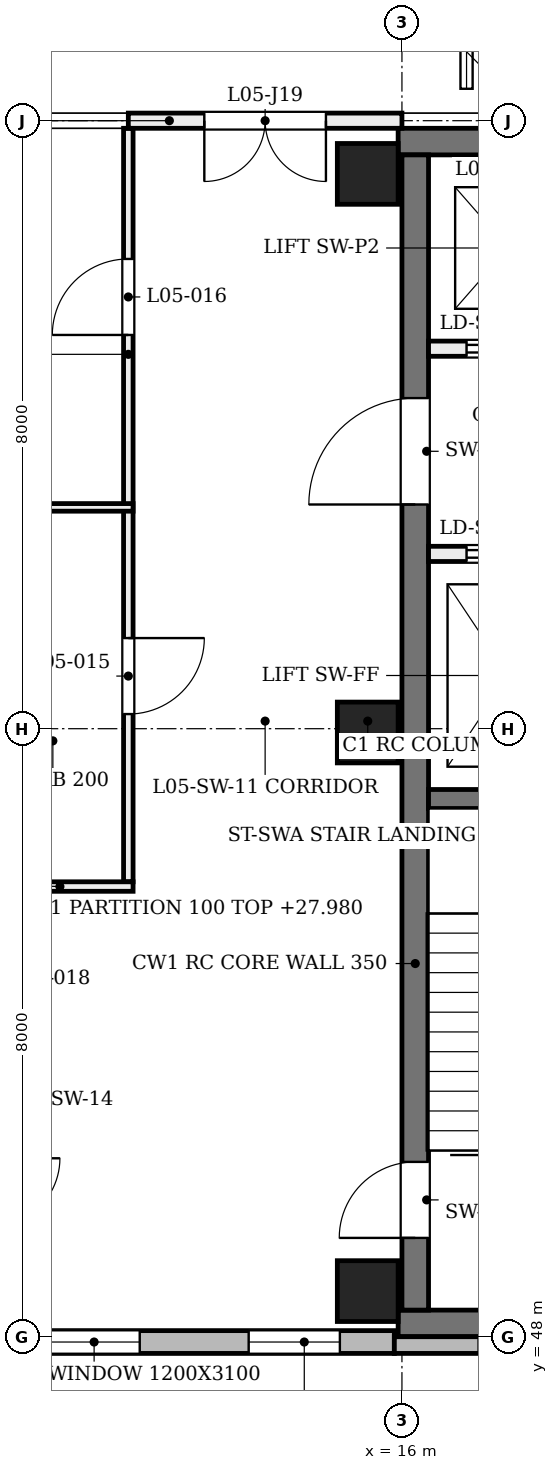
"""IFC4 building model, lengths in metres.
Left out: names, types, materials, properties, quantities, classifications, styles, units other than length and angle.
Written with IfcOpenShell. Run it as: python <this file> out.ifc"""

import sys

from ifc_helpers import new_model, si_unit, direction, frame, frame_2d, origin, origin_2d, place, context, subcontext, project, spatial, rectangle, extrude, element, fill, save


model = new_model("IFC4")
c1 = context("Model", 3, precision=1e-05, world=origin(), true_north=direction((0.0, 1.0)))
c2 = subcontext(c1, "Body", "Model", "MODEL_VIEW")
j1 = project(units=[si_unit("LENGTHUNIT", "METRE"), si_unit("PLANEANGLEUNIT", "RADIAN")], contexts=[c1])
p1 = place(None, origin())
s1 = spatial("IfcSite", under=j1, at=p1, CompositionType="ELEMENT")
p2 = place(p1, origin())
s2 = spatial("IfcBuilding", under=s1, at=p2, CompositionType="ELEMENT")
p3 = place(p2, frame((0.0, 0.0, 24.0)))
s3 = spatial("IfcBuildingStorey", under=s2, at=p3, CompositionType="ELEMENT", Elevation=24.0)
for number, where, z_axis, x_axis in (
    (1, (15.95, 48.175, 0.0), (0.0, 0.0, 1.0), (1.0, 0.0, 0.0)),
    (2, (15.95, 63.725, 0.0), (0.0, 0.0, 1.0), (1.0, 0.0, 0.0)),
):
    element("IfcWall", number, at=place(p3, frame(where, z_axis=z_axis, x_axis=x_axis)), inside=s3, PredefinedType="SHEAR", context=c2, shape_type="SweptSolid", body=[
        extrude(rectangle(XDim=7.95, YDim=0.35, at=frame_2d((3.975, 0.0))), origin(), (0.0, 0.0, 1.0), 4.58),
    ])
p4 = place(p3, frame((16.175, 48.35, 0.0), z_axis=(0.0, 0.0, 1.0), x_axis=(0.0, 1.0, 0.0)))
e3 = element("IfcWall", 3, at=p4, inside=s3, PredefinedType="SHEAR", context=c2, shape_type="SweptSolid", body=[
    extrude(rectangle(XDim=15.2, YDim=0.35, at=frame_2d((7.6, 0.0))), origin(), (0.0, 0.0, 1.0), 4.58),
])
p5 = place(p4, frame((0.95, 0.0, 0.0)))
e4 = element("IfcOpeningElement", 4, at=p5, cuts=e3, PredefinedType="OPENING", context=c2, shape_type="SweptSolid", body=[
    extrude(rectangle(XDim=1.0, YDim=2.1, at=frame_2d((0.5, 1.05))), frame((0.0, 0.185, 0.0), z_axis=(0.0, -1.0, 0.0), x_axis=(1.0, 0.0, 0.0)), (0.0, 0.0, 1.0), 0.37),
])
p6 = place(p4, frame((10.6, 0.0, 0.0)))
e5 = element("IfcOpeningElement", 5, at=p6, cuts=e3, PredefinedType="OPENING", context=c2, shape_type="SweptSolid", body=[
    extrude(rectangle(XDim=1.4, YDim=2.1, at=frame_2d((0.7, 1.05))), frame((0.0, 0.185, 0.0), z_axis=(0.0, -1.0, 0.0), x_axis=(1.0, 0.0, 0.0)), (0.0, 0.0, 1.0), 0.37),
])
for number, where, z_axis, x_axis in (
    (6, (15.55, 48.6, 0.0), (0.0, 0.0, 1.0), (1.0, 0.0, 0.0)),
    (7, (15.55, 55.95, 0.0), (0.0, 0.0, 1.0), (1.0, 0.0, 0.0)),
    (8, (15.55, 63.3, 0.0), (0.0, 0.0, 1.0), (1.0, 0.0, 0.0)),
):
    element("IfcColumn", number, at=place(p3, frame(where, z_axis=z_axis, x_axis=x_axis)), inside=s3, PredefinedType="COLUMN", context=c2, shape_type="SweptSolid", body=[
        extrude(rectangle(XDim=0.8, YDim=0.8, at=origin_2d()), origin(), (0.0, 0.0, 1.0), 4.8),
    ])
p7 = place(p3, frame((8.0, 47.93, 0.0), z_axis=(0.0, 0.0, 1.0), x_axis=(1.0, 0.0, 0.0)))
e9 = element("IfcWall", 9, at=p7, inside=s3, PredefinedType="SOLIDWALL", context=c2, shape_type="SweptSolid", body=[
    extrude(rectangle(XDim=7.9, YDim=0.3, at=frame_2d((3.95, 0.0))), origin(), (0.0, 0.0, 1.0), 3.9),
])
p8 = place(p7, frame((0.717, 0.0, 0.75)))
e10 = element("IfcOpeningElement", 10, at=p8, cuts=e9, PredefinedType="OPENING", context=c2, shape_type="SweptSolid", body=[
    extrude(rectangle(XDim=1.2, YDim=3.1, at=frame_2d((0.6, 1.55))), frame((0.0, 0.16, 0.0), z_axis=(0.0, -1.0, 0.0), x_axis=(1.0, 0.0, 0.0)), (0.0, 0.0, 1.0), 0.32),
])
p9 = place(p7, frame((3.35, 0.0, 0.75)))
e11 = element("IfcOpeningElement", 11, at=p9, cuts=e9, PredefinedType="OPENING", context=c2, shape_type="SweptSolid", body=[
    extrude(rectangle(XDim=1.2, YDim=3.1, at=frame_2d((0.6, 1.55))), frame((0.0, 0.16, 0.0), z_axis=(0.0, -1.0, 0.0), x_axis=(1.0, 0.0, 0.0)), (0.0, 0.0, 1.0), 0.32),
])
p10 = place(p7, frame((5.983, 0.0, 0.75)))
e12 = element("IfcOpeningElement", 12, at=p10, cuts=e9, PredefinedType="OPENING", context=c2, shape_type="SweptSolid", body=[
    extrude(rectangle(XDim=1.2, YDim=3.1, at=frame_2d((0.6, 1.55))), frame((0.0, 0.16, 0.0), z_axis=(0.0, -1.0, 0.0), x_axis=(1.0, 0.0, 0.0)), (0.0, 0.0, 1.0), 0.32),
])
p11 = place(p3, frame((15.9, 47.89, 0.0), z_axis=(0.0, 0.0, 1.0), x_axis=(1.0, 0.0, 0.0)))
e13 = element("IfcWall", 13, at=p11, inside=s3, PredefinedType="SOLIDWALL", context=c2, shape_type="SweptSolid", body=[
    extrude(rectangle(XDim=8.2, YDim=0.22, at=frame_2d((4.1, 0.0))), origin(), (0.0, 0.0, 1.0), 3.9),
])
p12 = place(p11, frame((1.108, 0.0, 0.9)))
e14 = element("IfcOpeningElement", 14, at=p12, cuts=e13, PredefinedType="OPENING", context=c2, shape_type="SweptSolid", body=[
    extrude(rectangle(XDim=0.45, YDim=2.6, at=frame_2d((0.225, 1.3))), frame((0.0, 0.12, 0.0), z_axis=(0.0, -1.0, 0.0), x_axis=(1.0, 0.0, 0.0)), (0.0, 0.0, 1.0), 0.24),
])
p13 = place(p11, frame((3.775, 0.0, 0.9)))
e15 = element("IfcOpeningElement", 15, at=p13, cuts=e13, PredefinedType="OPENING", context=c2, shape_type="SweptSolid", body=[
    extrude(rectangle(XDim=0.45, YDim=2.6, at=frame_2d((0.225, 1.3))), frame((0.0, 0.12, 0.0), z_axis=(0.0, -1.0, 0.0), x_axis=(1.0, 0.0, 0.0)), (0.0, 0.0, 1.0), 0.24),
])
p14 = place(p11, frame((6.442, 0.0, 0.9)))
e16 = element("IfcOpeningElement", 16, at=p14, cuts=e13, PredefinedType="OPENING", context=c2, shape_type="SweptSolid", body=[
    extrude(rectangle(XDim=0.45, YDim=2.6, at=frame_2d((0.225, 1.3))), frame((0.0, 0.12, 0.0), z_axis=(0.0, -1.0, 0.0), x_axis=(1.0, 0.0, 0.0)), (0.0, 0.0, 1.0), 0.24),
])
p15 = place(p3, frame((16.35, 55.075, 0.0), z_axis=(0.0, 0.0, 1.0), x_axis=(1.0, 0.0, 0.0)))
e17 = element("IfcWall", 17, at=p15, inside=s3, PredefinedType="SOLIDWALL", context=c2, shape_type="SweptSolid", body=[
    extrude(rectangle(XDim=3.1, YDim=0.25, at=frame_2d((1.55, 0.0))), origin(), (0.0, 0.0, 1.0), 4.55),
])
p16 = place(p3, frame((16.35, 58.3, 0.0), z_axis=(0.0, 0.0, 1.0), x_axis=(1.0, 0.0, 0.0)))
e18 = element("IfcWall", 18, at=p16, inside=s3, PredefinedType="SOLIDWALL", context=c2, shape_type="SweptSolid", body=[
    extrude(rectangle(XDim=7.2, YDim=0.2, at=frame_2d((3.6, 0.0))), origin(), (0.0, 0.0, 1.0), 4.55),
])
p17 = place(p16, frame((0.5, 0.0, 0.0)))
e19 = element("IfcOpeningElement", 19, at=p17, cuts=e18, PredefinedType="OPENING", context=c2, shape_type="SweptSolid", body=[
    extrude(rectangle(XDim=1.1, YDim=2.1, at=frame_2d((0.55, 1.05))), frame((0.0, 0.11, 0.0), z_axis=(0.0, -1.0, 0.0), x_axis=(1.0, 0.0, 0.0)), (0.0, 0.0, 1.0), 0.22),
])
p18 = place(p16, frame((5.6, 0.0, 0.0)))
e20 = element("IfcOpeningElement", 20, at=p18, cuts=e18, PredefinedType="OPENING", context=c2, shape_type="SweptSolid", body=[
    extrude(rectangle(XDim=1.1, YDim=2.1, at=frame_2d((0.55, 1.05))), frame((0.0, 0.11, 0.0), z_axis=(0.0, -1.0, 0.0), x_axis=(1.0, 0.0, 0.0)), (0.0, 0.0, 1.0), 0.22),
])
p19 = place(p16, frame((3.1, 0.0, 0.0)))
e21 = element("IfcOpeningElement", 21, at=p19, cuts=e18, PredefinedType="OPENING", context=c2, shape_type="SweptSolid", body=[
    extrude(rectangle(XDim=1.0, YDim=2.1, at=frame_2d((0.5, 1.05))), frame((0.0, 0.11, 0.0), z_axis=(0.0, -1.0, 0.0), x_axis=(1.0, 0.0, 0.0)), (0.0, 0.0, 1.0), 0.22),
])
p20 = place(p3, frame((16.35, 61.0, 0.0), z_axis=(0.0, 0.0, 1.0), x_axis=(1.0, 0.0, 0.0)))
e22 = element("IfcWall", 22, at=p20, inside=s3, PredefinedType="SOLIDWALL", context=c2, shape_type="SweptSolid", body=[
    extrude(rectangle(XDim=7.2, YDim=0.2, at=frame_2d((3.6, 0.0))), origin(), (0.0, 0.0, 1.0), 4.55),
])
p21 = place(p20, frame((0.5, 0.0, 0.0)))
e23 = element("IfcOpeningElement", 23, at=p21, cuts=e22, PredefinedType="OPENING", context=c2, shape_type="SweptSolid", body=[
    extrude(rectangle(XDim=1.1, YDim=2.1, at=frame_2d((0.55, 1.05))), frame((0.0, 0.11, 0.0), z_axis=(0.0, -1.0, 0.0), x_axis=(1.0, 0.0, 0.0)), (0.0, 0.0, 1.0), 0.22),
])
p22 = place(p20, frame((5.6, 0.0, 0.0)))
e24 = element("IfcOpeningElement", 24, at=p22, cuts=e22, PredefinedType="OPENING", context=c2, shape_type="SweptSolid", body=[
    extrude(rectangle(XDim=1.1, YDim=2.1, at=frame_2d((0.55, 1.05))), frame((0.0, 0.11, 0.0), z_axis=(0.0, -1.0, 0.0), x_axis=(1.0, 0.0, 0.0)), (0.0, 0.0, 1.0), 0.22),
])
p23 = place(p20, frame((3.1, 0.0, 0.0)))
e25 = element("IfcOpeningElement", 25, at=p23, cuts=e22, PredefinedType="OPENING", context=c2, shape_type="SweptSolid", body=[
    extrude(rectangle(XDim=1.0, YDim=2.1, at=frame_2d((0.5, 1.05))), frame((0.0, 0.11, 0.0), z_axis=(0.0, -1.0, 0.0), x_axis=(1.0, 0.0, 0.0)), (0.0, 0.0, 1.0), 0.22),
])
p24 = place(p3, frame((12.4, 53.986, 0.0), z_axis=(0.0, 0.0, 1.0), x_axis=(0.0, 1.0, 0.0)))
e26 = element("IfcWall", 26, at=p24, inside=s3, PredefinedType="PARTITIONING", context=c2, shape_type="SweptSolid", body=[
    extrude(rectangle(XDim=9.914, YDim=0.125, at=frame_2d((4.957, 0.0))), origin(), (0.0, 0.0, 1.0), 3.88),
])
p25 = place(p24, frame((2.207, 0.0, 0.0)))
e27 = element("IfcOpeningElement", 27, at=p25, cuts=e26, PredefinedType="OPENING", context=c2, shape_type="SweptSolid", body=[
    extrude(rectangle(XDim=1.0, YDim=2.1, at=frame_2d((0.5, 1.05))), frame((0.0, 0.073, 0.0), z_axis=(0.0, -1.0, 0.0), x_axis=(1.0, 0.0, 0.0)), (0.0, 0.0, 1.0), 0.145),
])
p26 = place(p24, frame((7.195, 0.0, 0.0)))
e28 = element("IfcOpeningElement", 28, at=p26, cuts=e26, PredefinedType="OPENING", context=c2, shape_type="SweptSolid", body=[
    extrude(rectangle(XDim=1.0, YDim=2.1, at=frame_2d((0.5, 1.05))), frame((0.0, 0.073, 0.0), z_axis=(0.0, -1.0, 0.0), x_axis=(1.0, 0.0, 0.0)), (0.0, 0.0, 1.0), 0.145),
])
p27 = place(p3, frame((10.538, 53.923, 0.0), z_axis=(0.0, 0.0, 1.0), x_axis=(1.0, 0.0, 0.0)))
e29 = element("IfcWall", 29, at=p27, inside=s3, PredefinedType="PARTITIONING", context=c2, shape_type="SweptSolid", body=[
    extrude(rectangle(XDim=1.925, YDim=0.125, at=frame_2d((0.962, 0.0))), origin(), (0.0, 0.0, 1.0), 4.56),
])
p28 = place(p3, frame((8.08, 58.912, 0.0), z_axis=(0.0, 0.0, 1.0), x_axis=(1.0, 0.0, 0.0)))
e30 = element("IfcWall", 30, at=p28, inside=s3, PredefinedType="PARTITIONING", context=c2, shape_type="SweptSolid", body=[
    extrude(rectangle(XDim=4.382, YDim=0.1, at=frame_2d((2.191, 0.0))), origin(), (0.0, 0.0, 1.0), 3.88),
])
p29 = place(p3, frame((12.4, 64.0, 0.0), z_axis=(0.0, 0.0, 1.0), x_axis=(1.0, 0.0, 0.0)))
e31 = element("IfcWall", 31, at=p29, inside=s3, PredefinedType="PARTITIONING", context=c2, shape_type="SweptSolid", body=[
    extrude(rectangle(XDim=3.6, YDim=0.2, at=frame_2d((1.8, 0.0))), origin(), (0.0, 0.0, 1.0), 3.88),
])
p30 = place(p29, frame((1.0, 0.0, 0.0)))
e32 = element("IfcOpeningElement", 32, at=p30, cuts=e31, PredefinedType="OPENING", context=c2, shape_type="SweptSolid", body=[
    extrude(rectangle(XDim=1.6, YDim=2.1, at=frame_2d((0.8, 1.05))), frame((0.0, 0.11, 0.0), z_axis=(0.0, -1.0, 0.0), x_axis=(1.0, 0.0, 0.0)), (0.0, 0.0, 1.0), 0.22),
])
p31 = place(p9, origin())
e33 = element("IfcWindow", 33, at=p31, inside=s3, PartitioningType="SINGLE_PANEL", PredefinedType="WINDOW", context=c2, shape_type="SweptSolid", body=[
    extrude(rectangle(XDim=1.2, YDim=3.1, at=frame_2d((0.6, 1.55))), frame((0.0, 0.03, 0.0), z_axis=(0.0, -1.0, 0.0), x_axis=(1.0, 0.0, 0.0)), (0.0, 0.0, 1.0), 0.06),
])
fill(e11, e33)
p32 = place(p10, origin())
e34 = element("IfcWindow", 34, at=p32, inside=s3, PartitioningType="SINGLE_PANEL", PredefinedType="WINDOW", context=c2, shape_type="SweptSolid", body=[
    extrude(rectangle(XDim=1.2, YDim=3.1, at=frame_2d((0.6, 1.55))), frame((0.0, 0.03, 0.0), z_axis=(0.0, -1.0, 0.0), x_axis=(1.0, 0.0, 0.0)), (0.0, 0.0, 1.0), 0.06),
])
fill(e12, e34)
p33 = place(p5, origin())
e35 = element("IfcDoor", 35, at=p33, inside=s3, OperationType="SINGLE_SWING_LEFT", PredefinedType="DOOR", context=c2, shape_type="SweptSolid", body=[
    extrude(rectangle(XDim=1.0, YDim=2.1, at=frame_2d((0.5, 1.05))), frame((0.0, 0.025, 0.0), z_axis=(0.0, -1.0, 0.0), x_axis=(1.0, 0.0, 0.0)), (0.0, 0.0, 1.0), 0.05),
])
fill(e4, e35)
p34 = place(p17, origin())
e36 = element("IfcDoor", 36, at=p34, inside=s3, OperationType="DOUBLE_DOOR_SLIDING", PredefinedType="DOOR", context=c2, shape_type="SweptSolid", body=[
    extrude(rectangle(XDim=1.1, YDim=2.1, at=frame_2d((0.55, 1.05))), frame((0.0, 0.025, 0.0), z_axis=(0.0, -1.0, 0.0), x_axis=(1.0, 0.0, 0.0)), (0.0, 0.0, 1.0), 0.05),
])
fill(e19, e36)
p35 = place(p21, frame((1.1, 0.0, 0.0), z_axis=(0.0, 0.0, 1.0), x_axis=(-1.0, 0.0, 0.0)))
e37 = element("IfcDoor", 37, at=p35, inside=s3, OperationType="DOUBLE_DOOR_SLIDING", PredefinedType="DOOR", context=c2, shape_type="SweptSolid", body=[
    extrude(rectangle(XDim=1.1, YDim=2.1, at=frame_2d((0.55, 1.05))), frame((0.0, 0.025, 0.0), z_axis=(0.0, -1.0, 0.0), x_axis=(1.0, 0.0, 0.0)), (0.0, 0.0, 1.0), 0.05),
])
fill(e23, e37)
p36 = place(p6, origin())
e38 = element("IfcDoor", 38, at=p36, inside=s3, OperationType="SINGLE_SWING_LEFT", PredefinedType="DOOR", context=c2, shape_type="SweptSolid", body=[
    extrude(rectangle(XDim=1.4, YDim=2.1, at=frame_2d((0.7, 1.05))), frame((0.0, 0.025, 0.0), z_axis=(0.0, -1.0, 0.0), x_axis=(1.0, 0.0, 0.0)), (0.0, 0.0, 1.0), 0.05),
])
fill(e5, e38)
p37 = place(p25, origin())
e39 = element("IfcDoor", 39, at=p37, inside=s3, OperationType="SINGLE_SWING_RIGHT", PredefinedType="DOOR", context=c2, shape_type="SweptSolid", body=[
    extrude(rectangle(XDim=1.0, YDim=2.1, at=frame_2d((0.5, 1.05))), frame((0.0, 0.025, 0.0), z_axis=(0.0, -1.0, 0.0), x_axis=(1.0, 0.0, 0.0)), (0.0, 0.0, 1.0), 0.05),
])
fill(e27, e39)
p38 = place(p26, origin())
e40 = element("IfcDoor", 40, at=p38, inside=s3, OperationType="SINGLE_SWING_LEFT", PredefinedType="DOOR", context=c2, shape_type="SweptSolid", body=[
    extrude(rectangle(XDim=1.0, YDim=2.1, at=frame_2d((0.5, 1.05))), frame((0.0, 0.025, 0.0), z_axis=(0.0, -1.0, 0.0), x_axis=(1.0, 0.0, 0.0)), (0.0, 0.0, 1.0), 0.05),
])
fill(e28, e40)
p39 = place(p30, frame((1.6, 0.0, 0.0), z_axis=(0.0, 0.0, 1.0), x_axis=(-1.0, 0.0, 0.0)))
e41 = element("IfcDoor", 41, at=p39, inside=s3, OperationType="DOUBLE_DOOR_SINGLE_SWING", PredefinedType="DOOR", context=c2, shape_type="SweptSolid", body=[
    extrude(rectangle(XDim=1.6, YDim=2.1, at=frame_2d((0.8, 1.05))), frame((0.0, 0.025, 0.0), z_axis=(0.0, -1.0, 0.0), x_axis=(1.0, 0.0, 0.0)), (0.0, 0.0, 1.0), 0.05),
])
fill(e32, e41)
save(model, sys.argv[1])
